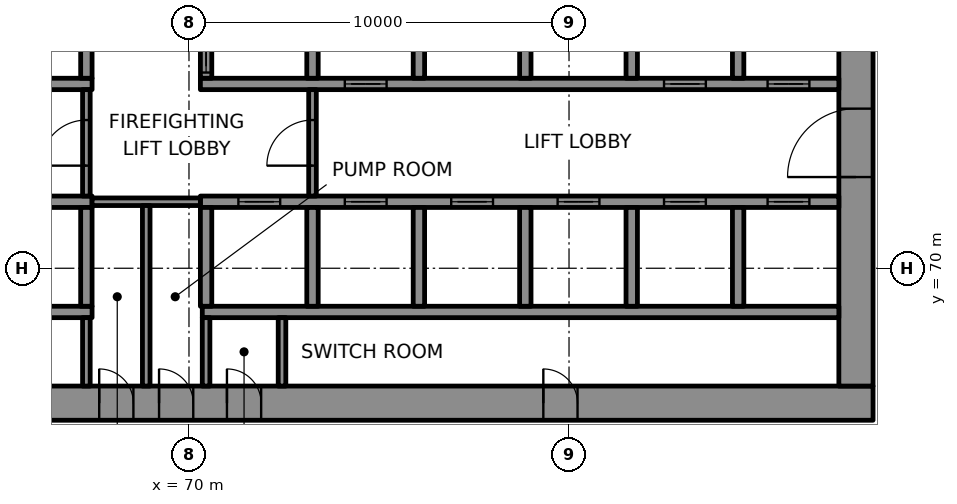
"""IFC4 building model, lengths in metres.
Left out: names, types, materials, properties, quantities, classifications, styles, units other than length and angle.
Written with IfcOpenShell. Run it as: python <this file> out.ifc"""

import sys

from ifc_helpers import new_model, si_unit, direction, frame, frame_2d, origin, place, context, subcontext, project, spatial, rectangle, extrude, element, fill, save


model = new_model("IFC4")
c1 = context("Model", 3, precision=1e-05, world=origin(), true_north=direction((0.0, 1.0)))
c2 = subcontext(c1, "Body", "Model", "MODEL_VIEW")
j1 = project(units=[si_unit("LENGTHUNIT", "METRE"), si_unit("PLANEANGLEUNIT", "RADIAN")], contexts=[c1])
p1 = place(None, origin())
s1 = spatial("IfcSite", under=j1, at=p1, CompositionType="ELEMENT")
p2 = place(p1, origin())
s2 = spatial("IfcBuilding", under=s1, at=p2, CompositionType="ELEMENT")
p3 = place(p2, frame((0.0, 0.0, 111.4)))
s3 = spatial("IfcBuildingStorey", under=s2, at=p3, CompositionType="ELEMENT", Elevation=111.4)
p4 = place(p3, frame((62.0, 66.45, 0.0), z_axis=(0.0, 0.0, 1.0), x_axis=(1.0, 0.0, 0.0)))
e1 = element("IfcWall", 1, at=p4, inside=s3, PredefinedType="SHEAR", context=c2, shape_type="SweptSolid", body=[
    extrude(rectangle(XDim=26.0, YDim=0.9, at=frame_2d((13.0, 0.0))), origin(), (0.0, 0.0, 1.0), 4.0),
])
p5 = place(p4, frame((3.45, 0.0, 0.0)))
e2 = element("IfcOpeningElement", 2, at=p5, cuts=e1, PredefinedType="OPENING", context=c2, shape_type="SweptSolid", body=[
    extrude(rectangle(XDim=0.9, YDim=2.1, at=frame_2d((0.45, 1.05))), frame((0.0, 0.46, 0.0), z_axis=(0.0, -1.0, 0.0), x_axis=(1.0, 0.0, 0.0)), (0.0, 0.0, 1.0), 0.92),
])
p6 = place(p4, frame((5.637, 0.0, 0.0)))
e3 = element("IfcOpeningElement", 3, at=p6, cuts=e1, PredefinedType="OPENING", context=c2, shape_type="SweptSolid", body=[
    extrude(rectangle(XDim=0.9, YDim=2.1, at=frame_2d((0.45, 1.05))), frame((0.0, 0.46, 0.0), z_axis=(0.0, -1.0, 0.0), x_axis=(1.0, 0.0, 0.0)), (0.0, 0.0, 1.0), 0.92),
])
p7 = place(p4, frame((7.212, 0.0, 0.0)))
e4 = element("IfcOpeningElement", 4, at=p7, cuts=e1, PredefinedType="OPENING", context=c2, shape_type="SweptSolid", body=[
    extrude(rectangle(XDim=0.9, YDim=2.1, at=frame_2d((0.45, 1.05))), frame((0.0, 0.46, 0.0), z_axis=(0.0, -1.0, 0.0), x_axis=(1.0, 0.0, 0.0)), (0.0, 0.0, 1.0), 0.92),
])
p8 = place(p4, frame((8.999, 0.0, 0.0)))
e5 = element("IfcOpeningElement", 5, at=p8, cuts=e1, PredefinedType="OPENING", context=c2, shape_type="SweptSolid", body=[
    extrude(rectangle(XDim=0.9, YDim=2.1, at=frame_2d((0.45, 1.05))), frame((0.0, 0.46, 0.0), z_axis=(0.0, -1.0, 0.0), x_axis=(1.0, 0.0, 0.0)), (0.0, 0.0, 1.0), 0.92),
])
p9 = place(p4, frame((17.324, 0.0, 0.0)))
e6 = element("IfcOpeningElement", 6, at=p9, cuts=e1, PredefinedType="OPENING", context=c2, shape_type="SweptSolid", body=[
    extrude(rectangle(XDim=0.9, YDim=2.1, at=frame_2d((0.45, 1.05))), frame((0.0, 0.46, 0.0), z_axis=(0.0, -1.0, 0.0), x_axis=(1.0, 0.0, 0.0)), (0.0, 0.0, 1.0), 0.92),
])
p10 = place(p3, frame((87.55, 66.9, 0.0), z_axis=(0.0, 0.0, 1.0), x_axis=(0.0, 1.0, 0.0)))
e7 = element("IfcWall", 7, at=p10, inside=s3, PredefinedType="SHEAR", context=c2, shape_type="SweptSolid", body=[
    extrude(rectangle(XDim=16.2, YDim=0.9, at=frame_2d((8.1, 0.0))), origin(), (0.0, 0.0, 1.0), 4.0),
])
p11 = place(p10, frame((5.5, 0.0, 0.0)))
e8 = element("IfcOpeningElement", 8, at=p11, cuts=e7, PredefinedType="OPENING", context=c2, shape_type="SweptSolid", body=[
    extrude(rectangle(XDim=1.8, YDim=2.1, at=frame_2d((0.9, 1.05))), frame((0.0, 0.46, 0.0), z_axis=(0.0, -1.0, 0.0), x_axis=(1.0, 0.0, 0.0)), (0.0, 0.0, 1.0), 0.92),
])
p12 = place(p10, frame((11.202, 0.0, 0.0)))
e9 = element("IfcOpeningElement", 9, at=p12, cuts=e7, PredefinedType="OPENING", context=c2, shape_type="SweptSolid", body=[
    extrude(rectangle(XDim=0.9, YDim=2.1, at=frame_2d((0.45, 1.05))), frame((0.0, 0.46, 0.0), z_axis=(0.0, -1.0, 0.0), x_axis=(1.0, 0.0, 0.0)), (0.0, 0.0, 1.0), 0.92),
])
p13 = place(p3, frame((64.35, 68.85, 0.0), z_axis=(0.0, 0.0, 1.0), x_axis=(1.0, 0.0, 0.0)))
e10 = element("IfcWall", 10, at=p13, inside=s3, PredefinedType="SHEAR", context=c2, shape_type="SweptSolid", body=[
    extrude(rectangle(XDim=3.1, YDim=0.3, at=frame_2d((1.55, 0.0))), origin(), (0.0, 0.0, 1.0), 4.0),
])
p14 = place(p3, frame((70.35, 68.85, 0.0), z_axis=(0.0, 0.0, 1.0), x_axis=(1.0, 0.0, 0.0)))
e11 = element("IfcWall", 11, at=p14, inside=s3, PredefinedType="SHEAR", context=c2, shape_type="SweptSolid", body=[
    extrude(rectangle(XDim=16.75, YDim=0.3, at=frame_2d((8.375, 0.0))), origin(), (0.0, 0.0, 1.0), 4.0),
])
p15 = place(p3, frame((64.35, 71.75, 0.0), z_axis=(0.0, 0.0, 1.0), x_axis=(1.0, 0.0, 0.0)))
e12 = element("IfcWall", 12, at=p15, inside=s3, PredefinedType="SHEAR", context=c2, shape_type="SweptSolid", body=[
    extrude(rectangle(XDim=3.1, YDim=0.3, at=frame_2d((1.55, 0.0))), origin(), (0.0, 0.0, 1.0), 4.0),
])
p16 = place(p3, frame((70.3, 71.75, 0.0), z_axis=(0.0, 0.0, 1.0), x_axis=(1.0, 0.0, 0.0)))
e13 = element("IfcWall", 13, at=p16, inside=s3, PredefinedType="SHEAR", context=c2, shape_type="SweptSolid", body=[
    extrude(rectangle(XDim=16.8, YDim=0.3, at=frame_2d((8.4, 0.0))), origin(), (0.0, 0.0, 1.0), 4.0),
])
p17 = place(p16, frame((1.0, 0.0, 0.0)))
e14 = element("IfcOpeningElement", 14, at=p17, cuts=e13, PredefinedType="OPENING", context=c2, shape_type="SweptSolid", body=[
    extrude(rectangle(XDim=1.1, YDim=2.1, at=frame_2d((0.55, 1.05))), frame((0.0, 0.16, 0.0), z_axis=(0.0, -1.0, 0.0), x_axis=(1.0, 0.0, 0.0)), (0.0, 0.0, 1.0), 0.32),
])
p18 = place(p16, frame((3.8, 0.0, 0.0)))
e15 = element("IfcOpeningElement", 15, at=p18, cuts=e13, PredefinedType="OPENING", context=c2, shape_type="SweptSolid", body=[
    extrude(rectangle(XDim=1.1, YDim=2.1, at=frame_2d((0.55, 1.05))), frame((0.0, 0.16, 0.0), z_axis=(0.0, -1.0, 0.0), x_axis=(1.0, 0.0, 0.0)), (0.0, 0.0, 1.0), 0.32),
])
p19 = place(p16, frame((6.6, 0.0, 0.0)))
e16 = element("IfcOpeningElement", 16, at=p19, cuts=e13, PredefinedType="OPENING", context=c2, shape_type="SweptSolid", body=[
    extrude(rectangle(XDim=1.1, YDim=2.1, at=frame_2d((0.55, 1.05))), frame((0.0, 0.16, 0.0), z_axis=(0.0, -1.0, 0.0), x_axis=(1.0, 0.0, 0.0)), (0.0, 0.0, 1.0), 0.32),
])
p20 = place(p16, frame((9.4, 0.0, 0.0)))
e17 = element("IfcOpeningElement", 17, at=p20, cuts=e13, PredefinedType="OPENING", context=c2, shape_type="SweptSolid", body=[
    extrude(rectangle(XDim=1.1, YDim=2.1, at=frame_2d((0.55, 1.05))), frame((0.0, 0.16, 0.0), z_axis=(0.0, -1.0, 0.0), x_axis=(1.0, 0.0, 0.0)), (0.0, 0.0, 1.0), 0.32),
])
p21 = place(p16, frame((12.2, 0.0, 0.0)))
e18 = element("IfcOpeningElement", 18, at=p21, cuts=e13, PredefinedType="OPENING", context=c2, shape_type="SweptSolid", body=[
    extrude(rectangle(XDim=1.1, YDim=2.1, at=frame_2d((0.55, 1.05))), frame((0.0, 0.16, 0.0), z_axis=(0.0, -1.0, 0.0), x_axis=(1.0, 0.0, 0.0)), (0.0, 0.0, 1.0), 0.32),
])
p22 = place(p16, frame((14.925, 0.0, 0.0)))
e19 = element("IfcOpeningElement", 19, at=p22, cuts=e13, PredefinedType="OPENING", context=c2, shape_type="SweptSolid", body=[
    extrude(rectangle(XDim=1.1, YDim=2.1, at=frame_2d((0.55, 1.05))), frame((0.0, 0.16, 0.0), z_axis=(0.0, -1.0, 0.0), x_axis=(1.0, 0.0, 0.0)), (0.0, 0.0, 1.0), 0.32),
])
p23 = place(p3, frame((64.35, 74.85, 0.0), z_axis=(0.0, 0.0, 1.0), x_axis=(1.0, 0.0, 0.0)))
e20 = element("IfcWall", 20, at=p23, inside=s3, PredefinedType="SHEAR", context=c2, shape_type="SweptSolid", body=[
    extrude(rectangle(XDim=3.1, YDim=0.3, at=frame_2d((1.55, 0.0))), origin(), (0.0, 0.0, 1.0), 4.0),
])
p24 = place(p3, frame((70.3, 74.85, 0.0), z_axis=(0.0, 0.0, 1.0), x_axis=(1.0, 0.0, 0.0)))
e21 = element("IfcWall", 21, at=p24, inside=s3, PredefinedType="SHEAR", context=c2, shape_type="SweptSolid", body=[
    extrude(rectangle(XDim=16.8, YDim=0.3, at=frame_2d((8.4, 0.0))), origin(), (0.0, 0.0, 1.0), 4.0),
])
p25 = place(p24, frame((3.8, 0.0, 0.0)))
e22 = element("IfcOpeningElement", 22, at=p25, cuts=e21, PredefinedType="OPENING", context=c2, shape_type="SweptSolid", body=[
    extrude(rectangle(XDim=1.1, YDim=2.1, at=frame_2d((0.55, 1.05))), frame((0.0, 0.16, 0.0), z_axis=(0.0, -1.0, 0.0), x_axis=(1.0, 0.0, 0.0)), (0.0, 0.0, 1.0), 0.32),
])
p26 = place(p24, frame((12.2, 0.0, 0.0)))
e23 = element("IfcOpeningElement", 23, at=p26, cuts=e21, PredefinedType="OPENING", context=c2, shape_type="SweptSolid", body=[
    extrude(rectangle(XDim=1.1, YDim=2.1, at=frame_2d((0.55, 1.05))), frame((0.0, 0.16, 0.0), z_axis=(0.0, -1.0, 0.0), x_axis=(1.0, 0.0, 0.0)), (0.0, 0.0, 1.0), 0.32),
])
p27 = place(p24, frame((14.925, 0.0, 0.0)))
e24 = element("IfcOpeningElement", 24, at=p27, cuts=e21, PredefinedType="OPENING", context=c2, shape_type="SweptSolid", body=[
    extrude(rectangle(XDim=1.1, YDim=2.1, at=frame_2d((0.55, 1.05))), frame((0.0, 0.16, 0.0), z_axis=(0.0, -1.0, 0.0), x_axis=(1.0, 0.0, 0.0)), (0.0, 0.0, 1.0), 0.32),
])
for number, where, z_axis, x_axis in (
    (25, (67.3, 69.0, 0.0), (0.0, 0.0, 1.0), (0.0, 1.0, 0.0)),
    (26, (67.3, 75.0, 0.0), (0.0, 0.0, 1.0), (0.0, 1.0, 0.0)),
    (27, (70.45, 69.0, 0.0), (0.0, 0.0, 1.0), (0.0, 1.0, 0.0)),
):
    element("IfcWall", number, at=place(p3, frame(where, z_axis=z_axis, x_axis=x_axis)), inside=s3, PredefinedType="SHEAR", context=c2, shape_type="SweptSolid", body=[
        extrude(rectangle(XDim=2.6, YDim=0.3, at=frame_2d((1.3, 0.0))), origin(), (0.0, 0.0, 1.0), 4.0),
    ])
p28 = place(p3, frame((70.45, 75.0, 0.0), z_axis=(0.0, 0.0, 1.0), x_axis=(0.0, 1.0, 0.0)))
e28 = element("IfcWall", 28, at=p28, inside=s3, PredefinedType="SHEAR", context=c2, shape_type="SweptSolid", body=[
    extrude(rectangle(XDim=2.6, YDim=0.3, at=frame_2d((1.3, 0.0))), origin(), (0.0, 0.0, 1.0), 4.0),
])
p29 = place(p28, frame((0.15, 0.0, 0.0)))
e29 = element("IfcOpeningElement", 29, at=p29, cuts=e28, PredefinedType="OPENING", context=c2, shape_type="SweptSolid", body=[
    extrude(rectangle(XDim=1.1, YDim=2.1, at=frame_2d((0.55, 1.05))), frame((0.0, 0.16, 0.0), z_axis=(0.0, -1.0, 0.0), x_axis=(1.0, 0.0, 0.0)), (0.0, 0.0, 1.0), 0.32),
])
for number, where, z_axis, x_axis in (
    (30, (73.25, 69.0, 0.0), (0.0, 0.0, 1.0), (0.0, 1.0, 0.0)),
    (31, (73.25, 75.0, 0.0), (0.0, 0.0, 1.0), (0.0, 1.0, 0.0)),
    (32, (76.05, 69.0, 0.0), (0.0, 0.0, 1.0), (0.0, 1.0, 0.0)),
    (33, (76.05, 75.0, 0.0), (0.0, 0.0, 1.0), (0.0, 1.0, 0.0)),
    (34, (78.85, 69.0, 0.0), (0.0, 0.0, 1.0), (0.0, 1.0, 0.0)),
    (35, (78.85, 75.0, 0.0), (0.0, 0.0, 1.0), (0.0, 1.0, 0.0)),
    (36, (81.65, 69.0, 0.0), (0.0, 0.0, 1.0), (0.0, 1.0, 0.0)),
    (37, (81.65, 75.0, 0.0), (0.0, 0.0, 1.0), (0.0, 1.0, 0.0)),
    (38, (84.45, 69.0, 0.0), (0.0, 0.0, 1.0), (0.0, 1.0, 0.0)),
    (39, (84.45, 75.0, 0.0), (0.0, 0.0, 1.0), (0.0, 1.0, 0.0)),
):
    element("IfcWall", number, at=place(p3, frame(where, z_axis=z_axis, x_axis=x_axis)), inside=s3, PredefinedType="SHEAR", context=c2, shape_type="SweptSolid", body=[
        extrude(rectangle(XDim=2.6, YDim=0.3, at=frame_2d((1.3, 0.0))), origin(), (0.0, 0.0, 1.0), 4.0),
    ])
p30 = place(p3, frame((67.45, 71.75, 0.0), z_axis=(0.0, 0.0, 1.0), x_axis=(1.0, 0.0, 0.0)))
e40 = element("IfcWall", 40, at=p30, inside=s3, PredefinedType="PARTITIONING", context=c2, shape_type="SweptSolid", body=[
    extrude(rectangle(XDim=2.85, YDim=0.2, at=frame_2d((1.425, 0.0))), origin(), (0.0, 0.0, 1.0), 4.0),
])
p31 = place(p3, frame((67.3, 66.9, 0.0), z_axis=(0.0, 0.0, 1.0), x_axis=(0.0, 1.0, 0.0)))
e41 = element("IfcWall", 41, at=p31, inside=s3, PredefinedType="PARTITIONING", context=c2, shape_type="SweptSolid", body=[
    extrude(rectangle(XDim=1.8, YDim=0.2, at=frame_2d((0.9, 0.0))), origin(), (0.0, 0.0, 1.0), 4.0),
])
p32 = place(p3, frame((67.3, 71.9, 0.0), z_axis=(0.0, 0.0, 1.0), x_axis=(0.0, 1.0, 0.0)))
e42 = element("IfcWall", 42, at=p32, inside=s3, PredefinedType="PARTITIONING", context=c2, shape_type="SweptSolid", body=[
    extrude(rectangle(XDim=2.8, YDim=0.2, at=frame_2d((1.4, 0.0))), origin(), (0.0, 0.0, 1.0), 4.0),
])
p33 = place(p32, frame((0.8, 0.0, 0.0)))
e43 = element("IfcOpeningElement", 43, at=p33, cuts=e42, PredefinedType="OPENING", context=c2, shape_type="SweptSolid", body=[
    extrude(rectangle(XDim=1.2, YDim=2.1, at=frame_2d((0.6, 1.05))), frame((0.0, 0.11, 0.0), z_axis=(0.0, -1.0, 0.0), x_axis=(1.0, 0.0, 0.0)), (0.0, 0.0, 1.0), 0.22),
])
p34 = place(p3, frame((68.875, 66.9, 0.0), z_axis=(0.0, 0.0, 1.0), x_axis=(0.0, 1.0, 0.0)))
e44 = element("IfcWall", 44, at=p34, inside=s3, PredefinedType="PARTITIONING", context=c2, shape_type="SweptSolid", body=[
    extrude(rectangle(XDim=4.75, YDim=0.2, at=frame_2d((2.375, 0.0))), origin(), (0.0, 0.0, 1.0), 4.0),
])
for number, where, z_axis, x_axis in (
    (45, (70.45, 66.9, 0.0), (0.0, 0.0, 1.0), (0.0, 1.0, 0.0)),
    (46, (72.448, 66.9, 0.0), (0.0, 0.0, 1.0), (0.0, 1.0, 0.0)),
):
    element("IfcWall", number, at=place(p3, frame(where, z_axis=z_axis, x_axis=x_axis)), inside=s3, PredefinedType="PARTITIONING", context=c2, shape_type="SweptSolid", body=[
        extrude(rectangle(XDim=1.8, YDim=0.2, at=frame_2d((0.9, 0.0))), origin(), (0.0, 0.0, 1.0), 4.0),
    ])
p35 = place(p3, frame((73.25, 71.9, 0.0), z_axis=(0.0, 0.0, 1.0), x_axis=(0.0, 1.0, 0.0)))
e47 = element("IfcWall", 47, at=p35, inside=s3, PredefinedType="PARTITIONING", context=c2, shape_type="SweptSolid", body=[
    extrude(rectangle(XDim=2.8, YDim=0.2, at=frame_2d((1.4, 0.0))), origin(), (0.0, 0.0, 1.0), 4.0),
])
p36 = place(p35, frame((0.8, 0.0, 0.0)))
e48 = element("IfcOpeningElement", 48, at=p36, cuts=e47, PredefinedType="OPENING", context=c2, shape_type="SweptSolid", body=[
    extrude(rectangle(XDim=1.2, YDim=2.1, at=frame_2d((0.6, 1.05))), frame((0.0, 0.11, 0.0), z_axis=(0.0, -1.0, 0.0), x_axis=(1.0, 0.0, 0.0)), (0.0, 0.0, 1.0), 0.22),
])
p37 = place(p17, origin())
e49 = element("IfcDoor", 49, at=p37, inside=s3, OperationType="DOUBLE_DOOR_SLIDING", PredefinedType="DOOR", context=c2, shape_type="SweptSolid", body=[
    extrude(rectangle(XDim=1.1, YDim=2.1, at=frame_2d((0.55, 1.05))), frame((0.0, 0.025, 0.0), z_axis=(0.0, -1.0, 0.0), x_axis=(1.0, 0.0, 0.0)), (0.0, 0.0, 1.0), 0.05),
])
fill(e14, e49)
p38 = place(p18, origin())
e50 = element("IfcDoor", 50, at=p38, inside=s3, OperationType="DOUBLE_DOOR_SLIDING", PredefinedType="DOOR", context=c2, shape_type="SweptSolid", body=[
    extrude(rectangle(XDim=1.1, YDim=2.1, at=frame_2d((0.55, 1.05))), frame((0.0, 0.025, 0.0), z_axis=(0.0, -1.0, 0.0), x_axis=(1.0, 0.0, 0.0)), (0.0, 0.0, 1.0), 0.05),
])
fill(e15, e50)
p39 = place(p19, origin())
e51 = element("IfcDoor", 51, at=p39, inside=s3, OperationType="DOUBLE_DOOR_SLIDING", PredefinedType="DOOR", context=c2, shape_type="SweptSolid", body=[
    extrude(rectangle(XDim=1.1, YDim=2.1, at=frame_2d((0.55, 1.05))), frame((0.0, 0.025, 0.0), z_axis=(0.0, -1.0, 0.0), x_axis=(1.0, 0.0, 0.0)), (0.0, 0.0, 1.0), 0.05),
])
fill(e16, e51)
p40 = place(p20, origin())
e52 = element("IfcDoor", 52, at=p40, inside=s3, OperationType="DOUBLE_DOOR_SLIDING", PredefinedType="DOOR", context=c2, shape_type="SweptSolid", body=[
    extrude(rectangle(XDim=1.1, YDim=2.1, at=frame_2d((0.55, 1.05))), frame((0.0, 0.025, 0.0), z_axis=(0.0, -1.0, 0.0), x_axis=(1.0, 0.0, 0.0)), (0.0, 0.0, 1.0), 0.05),
])
fill(e17, e52)
p41 = place(p21, origin())
e53 = element("IfcDoor", 53, at=p41, inside=s3, OperationType="DOUBLE_DOOR_SLIDING", PredefinedType="DOOR", context=c2, shape_type="SweptSolid", body=[
    extrude(rectangle(XDim=1.1, YDim=2.1, at=frame_2d((0.55, 1.05))), frame((0.0, 0.025, 0.0), z_axis=(0.0, -1.0, 0.0), x_axis=(1.0, 0.0, 0.0)), (0.0, 0.0, 1.0), 0.05),
])
fill(e18, e53)
p42 = place(p22, origin())
e54 = element("IfcDoor", 54, at=p42, inside=s3, OperationType="DOUBLE_DOOR_SLIDING", PredefinedType="DOOR", context=c2, shape_type="SweptSolid", body=[
    extrude(rectangle(XDim=1.1, YDim=2.1, at=frame_2d((0.55, 1.05))), frame((0.0, 0.025, 0.0), z_axis=(0.0, -1.0, 0.0), x_axis=(1.0, 0.0, 0.0)), (0.0, 0.0, 1.0), 0.05),
])
fill(e19, e54)
p43 = place(p29, origin())
e55 = element("IfcDoor", 55, at=p43, inside=s3, OperationType="DOUBLE_DOOR_SLIDING", PredefinedType="DOOR", context=c2, shape_type="SweptSolid", body=[
    extrude(rectangle(XDim=1.1, YDim=2.1, at=frame_2d((0.55, 1.05))), frame((0.0, 0.025, 0.0), z_axis=(0.0, -1.0, 0.0), x_axis=(1.0, 0.0, 0.0)), (0.0, 0.0, 1.0), 0.05),
])
fill(e29, e55)
p44 = place(p25, origin())
e56 = element("IfcDoor", 56, at=p44, inside=s3, OperationType="DOUBLE_DOOR_SLIDING", PredefinedType="DOOR", context=c2, shape_type="SweptSolid", body=[
    extrude(rectangle(XDim=1.1, YDim=2.1, at=frame_2d((0.55, 1.05))), frame((0.0, 0.025, 0.0), z_axis=(0.0, -1.0, 0.0), x_axis=(1.0, 0.0, 0.0)), (0.0, 0.0, 1.0), 0.05),
])
fill(e22, e56)
p45 = place(p26, origin())
e57 = element("IfcDoor", 57, at=p45, inside=s3, OperationType="DOUBLE_DOOR_SLIDING", PredefinedType="DOOR", context=c2, shape_type="SweptSolid", body=[
    extrude(rectangle(XDim=1.1, YDim=2.1, at=frame_2d((0.55, 1.05))), frame((0.0, 0.025, 0.0), z_axis=(0.0, -1.0, 0.0), x_axis=(1.0, 0.0, 0.0)), (0.0, 0.0, 1.0), 0.05),
])
fill(e23, e57)
p46 = place(p27, origin())
e58 = element("IfcDoor", 58, at=p46, inside=s3, OperationType="DOUBLE_DOOR_SLIDING", PredefinedType="DOOR", context=c2, shape_type="SweptSolid", body=[
    extrude(rectangle(XDim=1.1, YDim=2.1, at=frame_2d((0.55, 1.05))), frame((0.0, 0.025, 0.0), z_axis=(0.0, -1.0, 0.0), x_axis=(1.0, 0.0, 0.0)), (0.0, 0.0, 1.0), 0.05),
])
fill(e24, e58)
p47 = place(p36, origin())
e59 = element("IfcDoor", 59, at=p47, inside=s3, OperationType="SINGLE_SWING_LEFT", PredefinedType="DOOR", context=c2, shape_type="SweptSolid", body=[
    extrude(rectangle(XDim=1.2, YDim=2.1, at=frame_2d((0.6, 1.05))), frame((0.0, 0.025, 0.0), z_axis=(0.0, -1.0, 0.0), x_axis=(1.0, 0.0, 0.0)), (0.0, 0.0, 1.0), 0.05),
])
fill(e48, e59)
p48 = place(p33, origin())
e60 = element("IfcDoor", 60, at=p48, inside=s3, OperationType="SINGLE_SWING_RIGHT", PredefinedType="DOOR", context=c2, shape_type="SweptSolid", body=[
    extrude(rectangle(XDim=1.2, YDim=2.1, at=frame_2d((0.6, 1.05))), frame((0.0, 0.025, 0.0), z_axis=(0.0, -1.0, 0.0), x_axis=(1.0, 0.0, 0.0)), (0.0, 0.0, 1.0), 0.05),
])
fill(e43, e60)
p49 = place(p11, origin())
e61 = element("IfcDoor", 61, at=p49, inside=s3, OperationType="SINGLE_SWING_RIGHT", PredefinedType="DOOR", context=c2, shape_type="SweptSolid", body=[
    extrude(rectangle(XDim=1.8, YDim=2.1, at=frame_2d((0.9, 1.05))), frame((0.0, 0.17, 0.0), z_axis=(0.0, -1.0, 0.0), x_axis=(1.0, 0.0, 0.0)), (0.0, 0.0, 1.0), 0.34),
])
fill(e8, e61)
p50 = place(p6, origin())
e62 = element("IfcDoor", 62, at=p50, inside=s3, OperationType="SINGLE_SWING_RIGHT", PredefinedType="DOOR", context=c2, shape_type="SweptSolid", body=[
    extrude(rectangle(XDim=0.9, YDim=2.1, at=frame_2d((0.45, 1.05))), frame((0.0, 0.17, 0.0), z_axis=(0.0, -1.0, 0.0), x_axis=(1.0, 0.0, 0.0)), (0.0, 0.0, 1.0), 0.34),
])
fill(e3, e62)
p51 = place(p7, origin())
e63 = element("IfcDoor", 63, at=p51, inside=s3, OperationType="SINGLE_SWING_LEFT", PredefinedType="DOOR", context=c2, shape_type="SweptSolid", body=[
    extrude(rectangle(XDim=0.9, YDim=2.1, at=frame_2d((0.45, 1.05))), frame((0.0, 0.17, 0.0), z_axis=(0.0, -1.0, 0.0), x_axis=(1.0, 0.0, 0.0)), (0.0, 0.0, 1.0), 0.34),
])
fill(e4, e63)
p52 = place(p8, origin())
e64 = element("IfcDoor", 64, at=p52, inside=s3, OperationType="SINGLE_SWING_RIGHT", PredefinedType="DOOR", context=c2, shape_type="SweptSolid", body=[
    extrude(rectangle(XDim=0.9, YDim=2.1, at=frame_2d((0.45, 1.05))), frame((0.0, 0.17, 0.0), z_axis=(0.0, -1.0, 0.0), x_axis=(1.0, 0.0, 0.0)), (0.0, 0.0, 1.0), 0.34),
])
fill(e5, e64)
p53 = place(p9, origin())
e65 = element("IfcDoor", 65, at=p53, inside=s3, OperationType="SINGLE_SWING_LEFT", PredefinedType="DOOR", context=c2, shape_type="SweptSolid", body=[
    extrude(rectangle(XDim=0.9, YDim=2.1, at=frame_2d((0.45, 1.05))), frame((0.0, 0.17, 0.0), z_axis=(0.0, -1.0, 0.0), x_axis=(1.0, 0.0, 0.0)), (0.0, 0.0, 1.0), 0.34),
])
fill(e6, e65)
save(model, sys.argv[1])
